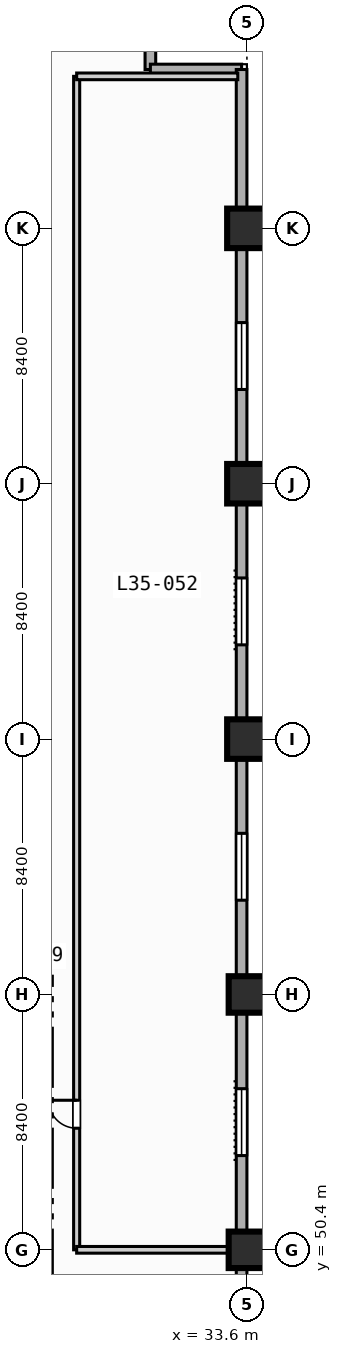
"""IFC4 building model, lengths in metres.
Left out: names, types, materials, properties, quantities, classifications, styles, units other than length and angle.
Written with IfcOpenShell. Run it as: python <this file> out.ifc"""

import sys

from ifc_helpers import new_model, si_unit, direction, frame, frame_2d, origin, origin_2d, place, context, subcontext, project, spatial, rectangle, extrude, element, fill, save


model = new_model("IFC4")
c1 = context("Model", 3, precision=1e-05, world=origin(), true_north=direction((0.0, 1.0)))
c2 = subcontext(c1, "Body", "Model", "MODEL_VIEW")
j1 = project(units=[si_unit("LENGTHUNIT", "METRE"), si_unit("PLANEANGLEUNIT", "RADIAN")], contexts=[c1])
p1 = place(None, origin())
s1 = spatial("IfcSite", under=j1, at=p1, CompositionType="ELEMENT")
p2 = place(p1, origin())
s2 = spatial("IfcBuilding", under=s1, at=p2, CompositionType="ELEMENT")
p3 = place(p2, frame((0.0, 0.0, 145.6)))
s3 = spatial("IfcBuildingStorey", under=s2, at=p3, CompositionType="ELEMENT", Elevation=145.6)
for number, where, z_axis, x_axis in (
    (1, (33.6, 50.4, 0.0), (0.0, 0.0, 1.0), (1.0, 0.0, 0.0)),
    (2, (33.6, 58.8, 0.0), (0.0, 0.0, 1.0), (1.0, 0.0, 0.0)),
):
    element("IfcColumn", number, at=place(p3, frame(where, z_axis=z_axis, x_axis=x_axis)), inside=s3, PredefinedType="COLUMN", context=c2, shape_type="SweptSolid", body=[
        extrude(rectangle(XDim=1.2, YDim=1.2, at=origin_2d()), origin(), (0.0, 0.0, 1.0), 3.8),
    ])
for number, where, z_axis, x_axis in (
    (3, (33.6, 67.2, 0.0), (0.0, 0.0, 1.0), (1.0, 0.0, 0.0)),
    (4, (33.6, 75.6, 0.0), (0.0, 0.0, 1.0), (1.0, 0.0, 0.0)),
    (5, (33.6, 84.0, 0.0), (0.0, 0.0, 1.0), (1.0, 0.0, 0.0)),
):
    element("IfcColumn", number, at=place(p3, frame(where, z_axis=z_axis, x_axis=x_axis)), inside=s3, PredefinedType="COLUMN", context=c2, shape_type="SweptSolid", body=[
        extrude(rectangle(XDim=1.3, YDim=1.3, at=origin_2d()), origin(), (0.0, 0.0, 1.0), 3.8),
    ])
for number, where, z_axis, x_axis in (
    (6, (30.425, 92.225, 0.0), (0.0, 0.0, 1.0), (0.0, -1.0, 0.0)),
    (7, (30.425, 89.225, 0.0), (0.0, 0.0, 1.0), (1.0, 0.0, 0.0)),
):
    element("IfcWall", number, at=place(p3, frame(where, z_axis=z_axis, x_axis=x_axis)), inside=s3, PredefinedType="STANDARD", context=c2, shape_type="SweptSolid", body=[
        extrude(rectangle(XDim=3.0, YDim=0.35, at=frame_2d((1.5, 0.0))), origin(), (0.0, 0.0, 1.0), 3.55),
    ])
p4 = place(p3, frame((33.425, 89.225, 0.0), z_axis=(0.0, 0.0, 1.0), x_axis=(0.0, -1.0, 0.0)))
e8 = element("IfcWall", 8, at=p4, inside=s3, PredefinedType="STANDARD", context=c2, shape_type="SweptSolid", body=[
    extrude(rectangle(XDim=55.8, YDim=0.35, at=frame_2d((27.9, 0.0))), origin(), (0.0, 0.0, 1.0), 3.55),
])
p5 = place(p4, frame((50.325, 0.0, 0.85)))
e9 = element("IfcOpeningElement", 9, at=p5, cuts=e8, PredefinedType="OPENING", context=c2, shape_type="SweptSolid", body=[
    extrude(rectangle(XDim=2.2, YDim=1.8, at=frame_2d((1.1, 0.9))), frame((0.0, 0.185, 0.0), z_axis=(0.0, -1.0, 0.0), x_axis=(1.0, 0.0, 0.0)), (0.0, 0.0, 1.0), 0.37),
])
p6 = place(p4, frame((33.525, 0.0, 0.85)))
e10 = element("IfcOpeningElement", 10, at=p6, cuts=e8, PredefinedType="OPENING", context=c2, shape_type="SweptSolid", body=[
    extrude(rectangle(XDim=2.2, YDim=1.8, at=frame_2d((1.1, 0.9))), frame((0.0, 0.185, 0.0), z_axis=(0.0, -1.0, 0.0), x_axis=(1.0, 0.0, 0.0)), (0.0, 0.0, 1.0), 0.37),
])
p7 = place(p4, frame((25.125, 0.0, 0.85)))
e11 = element("IfcOpeningElement", 11, at=p7, cuts=e8, PredefinedType="OPENING", context=c2, shape_type="SweptSolid", body=[
    extrude(rectangle(XDim=2.2, YDim=1.8, at=frame_2d((1.1, 0.9))), frame((0.0, 0.185, 0.0), z_axis=(0.0, -1.0, 0.0), x_axis=(1.0, 0.0, 0.0)), (0.0, 0.0, 1.0), 0.37),
])
p8 = place(p4, frame((16.725, 0.0, 0.85)))
e12 = element("IfcOpeningElement", 12, at=p8, cuts=e8, PredefinedType="OPENING", context=c2, shape_type="SweptSolid", body=[
    extrude(rectangle(XDim=2.2, YDim=1.8, at=frame_2d((1.1, 0.9))), frame((0.0, 0.185, 0.0), z_axis=(0.0, -1.0, 0.0), x_axis=(1.0, 0.0, 0.0)), (0.0, 0.0, 1.0), 0.37),
])
p9 = place(p4, frame((8.325, 0.0, 0.85)))
e13 = element("IfcOpeningElement", 13, at=p9, cuts=e8, PredefinedType="OPENING", context=c2, shape_type="SweptSolid", body=[
    extrude(rectangle(XDim=2.2, YDim=1.8, at=frame_2d((1.1, 0.9))), frame((0.0, 0.185, 0.0), z_axis=(0.0, -1.0, 0.0), x_axis=(1.0, 0.0, 0.0)), (0.0, 0.0, 1.0), 0.37),
])
p10 = place(p3, frame((28.0, 50.4, 0.0), z_axis=(0.0, 0.0, 1.0), x_axis=(0.0, 1.0, 0.0)))
e14 = element("IfcWall", 14, at=p10, inside=s3, PredefinedType="PARTITIONING", context=c2, shape_type="SweptSolid", body=[
    extrude(rectangle(XDim=38.6, YDim=0.2, at=frame_2d((19.3, 0.0))), origin(), (0.0, 0.0, 1.0), 3.55),
])
p11 = place(p10, frame((4.0, 0.0, 0.0)))
e15 = element("IfcOpeningElement", 15, at=p11, cuts=e14, PredefinedType="OPENING", context=c2, shape_type="SweptSolid", body=[
    extrude(rectangle(XDim=0.92, YDim=2.1, at=frame_2d((0.46, 1.05))), frame((0.0, 0.11, 0.0), z_axis=(0.0, -1.0, 0.0), x_axis=(1.0, 0.0, 0.0)), (0.0, 0.0, 1.0), 0.22),
])
p12 = place(p3, frame((28.0, 50.4, 0.0), z_axis=(0.0, 0.0, 1.0), x_axis=(1.0, 0.0, 0.0)))
e16 = element("IfcWall", 16, at=p12, inside=s3, PredefinedType="PARTITIONING", context=c2, shape_type="SweptSolid", body=[
    extrude(rectangle(XDim=5.3, YDim=0.22, at=frame_2d((2.65, 0.0))), origin(), (0.0, 0.0, 1.0), 2.8),
])
p13 = place(p3, frame((28.0, 89.0, 0.0), z_axis=(0.0, 0.0, 1.0), x_axis=(1.0, 0.0, 0.0)))
e17 = element("IfcWall", 17, at=p13, inside=s3, PredefinedType="PARTITIONING", context=c2, shape_type="SweptSolid", body=[
    extrude(rectangle(XDim=5.3, YDim=0.22, at=frame_2d((2.65, 0.0))), origin(), (0.0, 0.0, 1.0), 3.55),
])
p14 = place(p6, origin())
e18 = element("IfcWindow", 18, at=p14, inside=s3, PartitioningType="SINGLE_PANEL", PredefinedType="WINDOW", context=c2, shape_type="SweptSolid", body=[
    extrude(rectangle(XDim=2.2, YDim=1.8, at=frame_2d((1.1, 0.9))), frame((0.0, 0.03, 0.0), z_axis=(0.0, -1.0, 0.0), x_axis=(1.0, 0.0, 0.0)), (0.0, 0.0, 1.0), 0.06),
])
fill(e10, e18)
p15 = place(p7, origin())
e19 = element("IfcWindow", 19, at=p15, inside=s3, PartitioningType="SINGLE_PANEL", PredefinedType="WINDOW", context=c2, shape_type="SweptSolid", body=[
    extrude(rectangle(XDim=2.2, YDim=1.8, at=frame_2d((1.1, 0.9))), frame((0.0, 0.03, 0.0), z_axis=(0.0, -1.0, 0.0), x_axis=(1.0, 0.0, 0.0)), (0.0, 0.0, 1.0), 0.06),
])
fill(e11, e19)
p16 = place(p8, origin())
e20 = element("IfcWindow", 20, at=p16, inside=s3, PartitioningType="SINGLE_PANEL", PredefinedType="WINDOW", context=c2, shape_type="SweptSolid", body=[
    extrude(rectangle(XDim=2.2, YDim=1.8, at=frame_2d((1.1, 0.9))), frame((0.0, 0.03, 0.0), z_axis=(0.0, -1.0, 0.0), x_axis=(1.0, 0.0, 0.0)), (0.0, 0.0, 1.0), 0.06),
])
fill(e12, e20)
p17 = place(p9, origin())
e21 = element("IfcWindow", 21, at=p17, inside=s3, PartitioningType="SINGLE_PANEL", PredefinedType="WINDOW", context=c2, shape_type="SweptSolid", body=[
    extrude(rectangle(XDim=2.2, YDim=1.8, at=frame_2d((1.1, 0.9))), frame((0.0, 0.03, 0.0), z_axis=(0.0, -1.0, 0.0), x_axis=(1.0, 0.0, 0.0)), (0.0, 0.0, 1.0), 0.06),
])
fill(e13, e21)
p18 = place(p11, origin())
e22 = element("IfcDoor", 22, at=p18, inside=s3, OperationType="SINGLE_SWING_RIGHT", PredefinedType="DOOR", context=c2, shape_type="SweptSolid", body=[
    extrude(rectangle(XDim=0.92, YDim=2.1, at=frame_2d((0.46, 1.05))), frame((0.0, 0.025, 0.0), z_axis=(0.0, -1.0, 0.0), x_axis=(1.0, 0.0, 0.0)), (0.0, 0.0, 1.0), 0.05),
])
fill(e15, e22)
save(model, sys.argv[1])
